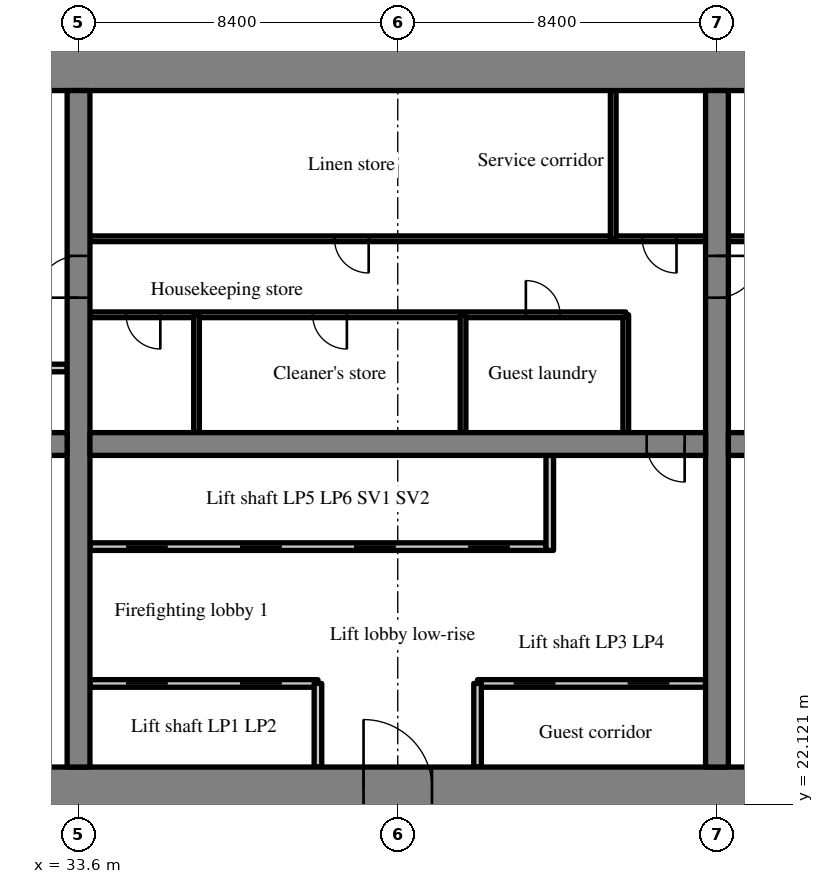
"""IFC4 building model, lengths in metres.
Left out: names, types, materials, properties, quantities, classifications, styles, units other than length and angle.
Written with IfcOpenShell. Run it as: python <this file> out.ifc"""

import sys

from ifc_helpers import new_model, si_unit, direction, frame, frame_2d, origin, place, context, subcontext, project, spatial, rectangle, extrude, source, transform, mapped, element, fill, save


model = new_model("IFC4")
c1 = context("Model", 3, precision=1e-05, world=origin(), true_north=direction((0.0, 1.0)))
c2 = subcontext(c1, "Body", "Model", "MODEL_VIEW")
j1 = project(units=[si_unit("LENGTHUNIT", "METRE"), si_unit("PLANEANGLEUNIT", "RADIAN")], contexts=[c1])
p1 = place(None, origin())
s1 = spatial("IfcSite", under=j1, at=p1, CompositionType="ELEMENT")
p2 = place(p1, origin())
s2 = spatial("IfcBuilding", under=s1, at=p2, CompositionType="ELEMENT")
p3 = place(p2, frame((0.0, 0.0, 35.4)))
s3 = spatial("IfcBuildingStorey", under=s2, at=p3, CompositionType="ELEMENT", Elevation=35.4)
m1 = source(origin(), c2, "Body", "SweptSolid", [
    extrude(rectangle(XDim=50.4, YDim=1.1, at=frame_2d((25.2, 0.0))), origin(), (0.0, 0.0, 1.0), 3.52),
])
p4 = place(p3, frame((25.2, 22.55, 0.0), z_axis=(0.0, 0.0, 1.0), x_axis=(1.0, 0.0, 0.0)))
e1 = element("IfcWall", 1, at=p4, inside=s3, PredefinedType="SHEAR", context=c2, shape_type="MappedRepresentation", body=[
    mapped(m1, transform((0.0, 0.0, 0.0), scale=1.0)),
])
m2 = source(origin(), c2, "Body", "SweptSolid", [
    extrude(rectangle(XDim=1.8, YDim=2.1, at=frame_2d((0.9, 1.05))), frame((0.0, 0.56, 0.0), z_axis=(0.0, -1.0, 0.0), x_axis=(1.0, 0.0, 0.0)), (0.0, 0.0, 1.0), 1.12),
])
p5 = place(p4, frame((15.9, 0.0, 0.0)))
e2 = element("IfcOpeningElement", 2, at=p5, cuts=e1, PredefinedType="OPENING", context=c2, shape_type="MappedRepresentation", body=[
    mapped(m2, transform((0.0, 0.0, 0.0), scale=1.0)),
])
m3 = source(origin(), c2, "Body", "SweptSolid", [
    extrude(rectangle(XDim=1.2, YDim=2.1, at=frame_2d((0.6, 1.05))), frame((0.0, 0.56, 0.0), z_axis=(0.0, -1.0, 0.0), x_axis=(1.0, 0.0, 0.0)), (0.0, 0.0, 1.0), 1.12),
])
p6 = place(p4, frame((27.0, 0.0, 0.0)))
e3 = element("IfcOpeningElement", 3, at=p6, cuts=e1, PredefinedType="OPENING", context=c2, shape_type="MappedRepresentation", body=[
    mapped(m3, transform((0.0, 0.0, 0.0), scale=1.0)),
])
m4 = source(origin(), c2, "Body", "SweptSolid", [
    extrude(rectangle(XDim=0.9, YDim=2.1, at=frame_2d((0.45, 1.05))), frame((0.0, 0.56, 0.0), z_axis=(0.0, -1.0, 0.0), x_axis=(1.0, 0.0, 0.0)), (0.0, 0.0, 1.0), 1.12),
])
p7 = place(p4, frame((33.75, 0.0, 0.0)))
e4 = element("IfcOpeningElement", 4, at=p7, cuts=e1, PredefinedType="OPENING", context=c2, shape_type="MappedRepresentation", body=[
    mapped(m4, transform((0.0, 0.0, 0.0), scale=1.0)),
])
p8 = place(p4, frame((30.75, 0.0, 0.0)))
e5 = element("IfcOpeningElement", 5, at=p8, cuts=e1, PredefinedType="OPENING", context=c2, shape_type="MappedRepresentation", body=[
    mapped(m4, transform((0.0, 0.0, 0.0), scale=1.0)),
])
p9 = place(p4, frame((39.75, 0.0, 0.0)))
e6 = element("IfcOpeningElement", 6, at=p9, cuts=e1, PredefinedType="OPENING", context=c2, shape_type="MappedRepresentation", body=[
    mapped(m4, transform((0.0, 0.0, 0.0), scale=1.0)),
])
p10 = place(p4, frame((36.75, 0.0, 0.0)))
e7 = element("IfcOpeningElement", 7, at=p10, cuts=e1, PredefinedType="OPENING", context=c2, shape_type="MappedRepresentation", body=[
    mapped(m4, transform((0.0, 0.0, 0.0), scale=1.0)),
])
p11 = place(p4, frame((6.425, 0.0, 0.0)))
e8 = element("IfcOpeningElement", 8, at=p11, cuts=e1, PredefinedType="OPENING", context=c2, shape_type="MappedRepresentation", body=[
    mapped(m3, transform((0.0, 0.0, 0.0), scale=1.0)),
])
p12 = place(p4, frame((47.675, 0.0, 0.0)))
e9 = element("IfcOpeningElement", 9, at=p12, cuts=e1, PredefinedType="OPENING", context=c2, shape_type="MappedRepresentation", body=[
    mapped(m3, transform((0.0, 0.0, 0.0), scale=1.0)),
])
p13 = place(p3, frame((25.2, 41.45, 0.0), z_axis=(0.0, 0.0, 1.0), x_axis=(1.0, 0.0, 0.0)))
e10 = element("IfcWall", 10, at=p13, inside=s3, PredefinedType="SHEAR", context=c2, shape_type="MappedRepresentation", body=[
    mapped(m1, transform((0.0, 0.0, 0.0), scale=1.0)),
])
m5 = source(origin(), c2, "Body", "SweptSolid", [
    extrude(rectangle(XDim=17.8, YDim=0.6, at=frame_2d((8.9, 0.0))), origin(), (0.0, 0.0, 1.0), 3.52),
])
p14 = place(p3, frame((33.6, 23.1, 0.0), z_axis=(0.0, 0.0, 1.0), x_axis=(0.0, 1.0, 0.0)))
e11 = element("IfcWall", 11, at=p14, inside=s3, PredefinedType="SHEAR", context=c2, shape_type="MappedRepresentation", body=[
    mapped(m5, transform((0.0, 0.0, 0.0), scale=1.0)),
])
m6 = source(origin(), c2, "Body", "SweptSolid", [
    extrude(rectangle(XDim=1.1, YDim=2.1, at=frame_2d((0.55, 1.05))), frame((0.0, 0.31, 0.0), z_axis=(0.0, -1.0, 0.0), x_axis=(1.0, 0.0, 0.0)), (0.0, 0.0, 1.0), 0.62),
])
p15 = place(p14, frame((12.35, 0.0, 0.0)))
e12 = element("IfcOpeningElement", 12, at=p15, cuts=e11, PredefinedType="OPENING", context=c2, shape_type="MappedRepresentation", body=[
    mapped(m6, transform((0.0, 0.0, 0.0), scale=1.0)),
])
p16 = place(p3, frame((50.4, 23.1, 0.0), z_axis=(0.0, 0.0, 1.0), x_axis=(0.0, 1.0, 0.0)))
e13 = element("IfcWall", 13, at=p16, inside=s3, PredefinedType="SHEAR", context=c2, shape_type="MappedRepresentation", body=[
    mapped(m5, transform((0.0, 0.0, 0.0), scale=1.0)),
])
p17 = place(p16, frame((12.35, 0.0, 0.0)))
e14 = element("IfcOpeningElement", 14, at=p17, cuts=e13, PredefinedType="OPENING", context=c2, shape_type="MappedRepresentation", body=[
    mapped(m6, transform((0.0, 0.0, 0.0), scale=1.0)),
])
m7 = source(origin(), c2, "Body", "SweptSolid", [
    extrude(rectangle(XDim=7.0, YDim=0.6, at=frame_2d((3.5, 0.0))), origin(), (0.0, 0.0, 1.0), 3.52),
])
p18 = place(p3, frame((26.3, 31.6, 0.0), z_axis=(0.0, 0.0, 1.0), x_axis=(1.0, 0.0, 0.0)))
e15 = element("IfcWall", 15, at=p18, inside=s3, PredefinedType="SHEAR", context=c2, shape_type="MappedRepresentation", body=[
    mapped(m7, transform((0.0, 0.0, 0.0), scale=1.0)),
])
p19 = place(p18, frame((5.375, 0.0, 0.0)))
e16 = element("IfcOpeningElement", 16, at=p19, cuts=e15, PredefinedType="OPENING", context=c2, shape_type="MappedRepresentation", body=[
    mapped(m6, transform((0.0, 0.0, 0.0), scale=1.0)),
])
m8 = source(origin(), c2, "Body", "SweptSolid", [
    extrude(rectangle(XDim=16.2, YDim=0.6, at=frame_2d((8.1, 0.0))), origin(), (0.0, 0.0, 1.0), 3.52),
])
p20 = place(p3, frame((33.9, 31.6, 0.0), z_axis=(0.0, 0.0, 1.0), x_axis=(1.0, 0.0, 0.0)))
e17 = element("IfcWall", 17, at=p20, inside=s3, PredefinedType="SHEAR", context=c2, shape_type="MappedRepresentation", body=[
    mapped(m8, transform((0.0, 0.0, 0.0), scale=1.0)),
])
m9 = source(origin(), c2, "Body", "SweptSolid", [
    extrude(rectangle(XDim=1.0, YDim=2.1, at=frame_2d((0.5, 1.05))), frame((0.0, 0.31, 0.0), z_axis=(0.0, -1.0, 0.0), x_axis=(1.0, 0.0, 0.0)), (0.0, 0.0, 1.0), 0.62),
])
p21 = place(p20, frame((14.65, 0.0, 0.0)))
e18 = element("IfcOpeningElement", 18, at=p21, cuts=e17, PredefinedType="OPENING", context=c2, shape_type="MappedRepresentation", body=[
    mapped(m9, transform((0.0, 0.0, 0.0), scale=1.0)),
])
m10 = source(origin(), c2, "Body", "SweptSolid", [
    extrude(rectangle(XDim=16.2, YDim=0.6, at=frame_2d((8.1, 0.0))), origin(), (0.0, 0.0, 1.0), 3.52),
])
p22 = place(p3, frame((50.7, 31.6, 0.0), z_axis=(0.0, 0.0, 1.0), x_axis=(1.0, 0.0, 0.0)))
e19 = element("IfcWall", 19, at=p22, inside=s3, PredefinedType="SHEAR", context=c2, shape_type="MappedRepresentation", body=[
    mapped(m10, transform((0.0, 0.0, 0.0), scale=1.0)),
])
p23 = place(p22, frame((0.55, 0.0, 0.0)))
e20 = element("IfcOpeningElement", 20, at=p23, cuts=e19, PredefinedType="OPENING", context=c2, shape_type="MappedRepresentation", body=[
    mapped(m9, transform((0.0, 0.0, 0.0), scale=1.0)),
])
m11 = source(origin(), c2, "Body", "SweptSolid", [
    extrude(rectangle(XDim=6.0, YDim=0.2, at=frame_2d((3.0, 0.0))), origin(), (0.0, 0.0, 1.0), 3.52),
])
p24 = place(p3, frame((33.9, 25.3, 0.0), z_axis=(0.0, 0.0, 1.0), x_axis=(1.0, 0.0, 0.0)))
e21 = element("IfcWall", 21, at=p24, inside=s3, PredefinedType="SOLIDWALL", context=c2, shape_type="MappedRepresentation", body=[
    mapped(m11, transform((0.0, 0.0, 0.0), scale=1.0)),
])
m12 = source(origin(), c2, "Body", "SweptSolid", [
    extrude(rectangle(XDim=1.1, YDim=2.1, at=frame_2d((0.55, 1.05))), frame((0.0, 0.11, 0.0), z_axis=(0.0, -1.0, 0.0), x_axis=(1.0, 0.0, 0.0)), (0.0, 0.0, 1.0), 0.22),
])
p25 = place(p24, frame((0.95, 0.0, 0.0)))
e22 = element("IfcOpeningElement", 22, at=p25, cuts=e21, PredefinedType="OPENING", context=c2, shape_type="MappedRepresentation", body=[
    mapped(m12, transform((0.0, 0.0, 0.0), scale=1.0)),
])
p26 = place(p24, frame((3.95, 0.0, 0.0)))
e23 = element("IfcOpeningElement", 23, at=p26, cuts=e21, PredefinedType="OPENING", context=c2, shape_type="MappedRepresentation", body=[
    mapped(m12, transform((0.0, 0.0, 0.0), scale=1.0)),
])
p27 = place(p3, frame((44.1, 25.3, 0.0), z_axis=(0.0, 0.0, 1.0), x_axis=(1.0, 0.0, 0.0)))
e24 = element("IfcWall", 24, at=p27, inside=s3, PredefinedType="SOLIDWALL", context=c2, shape_type="MappedRepresentation", body=[
    mapped(m11, transform((0.0, 0.0, 0.0), scale=1.0)),
])
p28 = place(p27, frame((0.95, 0.0, 0.0)))
e25 = element("IfcOpeningElement", 25, at=p28, cuts=e24, PredefinedType="OPENING", context=c2, shape_type="MappedRepresentation", body=[
    mapped(m12, transform((0.0, 0.0, 0.0), scale=1.0)),
])
p29 = place(p27, frame((3.95, 0.0, 0.0)))
e26 = element("IfcOpeningElement", 26, at=p29, cuts=e24, PredefinedType="OPENING", context=c2, shape_type="MappedRepresentation", body=[
    mapped(m12, transform((0.0, 0.0, 0.0), scale=1.0)),
])
m13 = source(origin(), c2, "Body", "SweptSolid", [
    extrude(rectangle(XDim=12.0, YDim=0.2, at=frame_2d((6.0, 0.0))), origin(), (0.0, 0.0, 1.0), 3.52),
])
p30 = place(p3, frame((33.9, 28.9, 0.0), z_axis=(0.0, 0.0, 1.0), x_axis=(1.0, 0.0, 0.0)))
e27 = element("IfcWall", 27, at=p30, inside=s3, PredefinedType="SOLIDWALL", context=c2, shape_type="MappedRepresentation", body=[
    mapped(m13, transform((0.0, 0.0, 0.0), scale=1.0)),
])
p31 = place(p30, frame((0.95, 0.0, 0.0)))
e28 = element("IfcOpeningElement", 28, at=p31, cuts=e27, PredefinedType="OPENING", context=c2, shape_type="MappedRepresentation", body=[
    mapped(m12, transform((0.0, 0.0, 0.0), scale=1.0)),
])
p32 = place(p30, frame((3.95, 0.0, 0.0)))
e29 = element("IfcOpeningElement", 29, at=p32, cuts=e27, PredefinedType="OPENING", context=c2, shape_type="MappedRepresentation", body=[
    mapped(m12, transform((0.0, 0.0, 0.0), scale=1.0)),
])
p33 = place(p30, frame((6.95, 0.0, 0.0)))
e30 = element("IfcOpeningElement", 30, at=p33, cuts=e27, PredefinedType="OPENING", context=c2, shape_type="MappedRepresentation", body=[
    mapped(m12, transform((0.0, 0.0, 0.0), scale=1.0)),
])
p34 = place(p30, frame((9.95, 0.0, 0.0)))
e31 = element("IfcOpeningElement", 31, at=p34, cuts=e27, PredefinedType="OPENING", context=c2, shape_type="MappedRepresentation", body=[
    mapped(m12, transform((0.0, 0.0, 0.0), scale=1.0)),
])
m14 = source(origin(), c2, "Body", "SweptSolid", [
    extrude(rectangle(XDim=2.2, YDim=0.2, at=frame_2d((1.1, 0.0))), origin(), (0.0, 0.0, 1.0), 3.52),
])
for number, where, z_axis, x_axis in (
    (32, (39.9, 23.1, 0.0), (0.0, 0.0, 1.0), (0.0, 1.0, 0.0)),
    (33, (44.1, 23.1, 0.0), (0.0, 0.0, 1.0), (0.0, 1.0, 0.0)),
):
    element("IfcWall", number, at=place(p3, frame(where, z_axis=z_axis, x_axis=x_axis)), inside=s3, PredefinedType="SOLIDWALL", context=c2, shape_type="MappedRepresentation", body=[
        mapped(m14, transform((0.0, 0.0, 0.0), scale=1.0)),
    ])
m15 = source(origin(), c2, "Body", "SweptSolid", [
    extrude(rectangle(XDim=2.5, YDim=0.2, at=frame_2d((1.25, 0.0))), origin(), (0.0, 0.0, 1.0), 3.52),
])
p35 = place(p3, frame((46.0, 28.8, 0.0), z_axis=(0.0, 0.0, 1.0), x_axis=(0.0, 1.0, 0.0)))
e34 = element("IfcWall", 34, at=p35, inside=s3, PredefinedType="SOLIDWALL", context=c2, shape_type="MappedRepresentation", body=[
    mapped(m15, transform((0.0, 0.0, 0.0), scale=1.0)),
])
m16 = source(origin(), c2, "Body", "SweptSolid", [
    extrude(rectangle(XDim=3.1, YDim=0.15, at=frame_2d((1.55, 0.0))), origin(), (0.0, 0.0, 1.0), 3.52),
])
p36 = place(p3, frame((48.0, 31.9, 0.0), z_axis=(0.0, 0.0, 1.0), x_axis=(0.0, 1.0, 0.0)))
e35 = element("IfcWall", 35, at=p36, inside=s3, PredefinedType="PARTITIONING", context=c2, shape_type="MappedRepresentation", body=[
    mapped(m16, transform((0.0, 0.0, 0.0), scale=1.0)),
])
m17 = source(origin(), c2, "Body", "SweptSolid", [
    extrude(rectangle(XDim=14.1, YDim=0.15, at=frame_2d((7.05, 0.0))), origin(), (0.0, 0.0, 1.0), 3.52),
])
p37 = place(p3, frame((33.9, 35.0, 0.0), z_axis=(0.0, 0.0, 1.0), x_axis=(1.0, 0.0, 0.0)))
e36 = element("IfcWall", 36, at=p37, inside=s3, PredefinedType="PARTITIONING", context=c2, shape_type="MappedRepresentation", body=[
    mapped(m17, transform((0.0, 0.0, 0.0), scale=1.0)),
])
m18 = source(origin(), c2, "Body", "SweptSolid", [
    extrude(rectangle(XDim=0.9, YDim=2.1, at=frame_2d((0.45, 1.05))), frame((0.0, 0.085, 0.0), z_axis=(0.0, -1.0, 0.0), x_axis=(1.0, 0.0, 0.0)), (0.0, 0.0, 1.0), 0.17),
])
p38 = place(p37, frame((0.952, 0.0, 0.0)))
e37 = element("IfcOpeningElement", 37, at=p38, cuts=e36, PredefinedType="OPENING", context=c2, shape_type="MappedRepresentation", body=[
    mapped(m18, transform((0.0, 0.0, 0.0), scale=1.0)),
])
p39 = place(p37, frame((5.861, 0.0, 0.0)))
e38 = element("IfcOpeningElement", 38, at=p39, cuts=e36, PredefinedType="OPENING", context=c2, shape_type="MappedRepresentation", body=[
    mapped(m18, transform((0.0, 0.0, 0.0), scale=1.0)),
])
p40 = place(p37, frame((11.471, 0.0, 0.0)))
e39 = element("IfcOpeningElement", 39, at=p40, cuts=e36, PredefinedType="OPENING", context=c2, shape_type="MappedRepresentation", body=[
    mapped(m18, transform((0.0, 0.0, 0.0), scale=1.0)),
])
m19 = source(origin(), c2, "Body", "SweptSolid", [
    extrude(rectangle(XDim=16.2, YDim=0.15, at=frame_2d((8.1, 0.0))), origin(), (0.0, 0.0, 1.0), 3.52),
])
p41 = place(p3, frame((33.9, 37.0, 0.0), z_axis=(0.0, 0.0, 1.0), x_axis=(1.0, 0.0, 0.0)))
e40 = element("IfcWall", 40, at=p41, inside=s3, PredefinedType="PARTITIONING", context=c2, shape_type="MappedRepresentation", body=[
    mapped(m19, transform((0.0, 0.0, 0.0), scale=1.0)),
])
p42 = place(p41, frame((6.435, 0.0, 0.0)))
e41 = element("IfcOpeningElement", 41, at=p42, cuts=e40, PredefinedType="OPENING", context=c2, shape_type="MappedRepresentation", body=[
    mapped(m18, transform((0.0, 0.0, 0.0), scale=1.0)),
])
p43 = place(p41, frame((14.535, 0.0, 0.0)))
e42 = element("IfcOpeningElement", 42, at=p43, cuts=e40, PredefinedType="OPENING", context=c2, shape_type="MappedRepresentation", body=[
    mapped(m18, transform((0.0, 0.0, 0.0), scale=1.0)),
])
for number, where, z_axis, x_axis in (
    (43, (36.705, 31.9, 0.0), (0.0, 0.0, 1.0), (0.0, 1.0, 0.0)),
    (44, (43.718, 31.9, 0.0), (0.0, 0.0, 1.0), (0.0, 1.0, 0.0)),
):
    element("IfcWall", number, at=place(p3, frame(where, z_axis=z_axis, x_axis=x_axis)), inside=s3, PredefinedType="PARTITIONING", context=c2, shape_type="MappedRepresentation", body=[
        mapped(m16, transform((0.0, 0.0, 0.0), scale=1.0)),
    ])
m20 = source(origin(), c2, "Body", "SweptSolid", [
    extrude(rectangle(XDim=3.9, YDim=0.15, at=frame_2d((1.95, 0.0))), origin(), (0.0, 0.0, 1.0), 3.52),
])
p44 = place(p3, frame((47.67, 37.0, 0.0), z_axis=(0.0, 0.0, 1.0), x_axis=(0.0, 1.0, 0.0)))
e45 = element("IfcWall", 45, at=p44, inside=s3, PredefinedType="PARTITIONING", context=c2, shape_type="MappedRepresentation", body=[
    mapped(m20, transform((0.0, 0.0, 0.0), scale=1.0)),
])
m21 = source(origin(), c2, "Body", "SweptSolid", [
    extrude(rectangle(XDim=16.2, YDim=0.15, at=frame_2d((8.1, 0.0))), origin(), (0.0, 0.0, 1.0), 3.52),
])
p45 = place(p3, frame((66.9, 37.0, 0.0), z_axis=(0.0, 0.0, 1.0), x_axis=(-1.0, 0.0, 0.0)))
e46 = element("IfcWall", 46, at=p45, inside=s3, PredefinedType="PARTITIONING", context=c2, shape_type="MappedRepresentation", body=[
    mapped(m21, transform((0.0, 0.0, 0.0), scale=1.0)),
])
p46 = place(p45, frame((1.575, 0.0, 0.0)))
e47 = element("IfcOpeningElement", 47, at=p46, cuts=e46, PredefinedType="OPENING", context=c2, shape_type="MappedRepresentation", body=[
    mapped(m18, transform((0.0, 0.0, 0.0), scale=1.0)),
])
p47 = place(p45, frame((7.245, 0.0, 0.0)))
e48 = element("IfcOpeningElement", 48, at=p47, cuts=e46, PredefinedType="OPENING", context=c2, shape_type="MappedRepresentation", body=[
    mapped(m18, transform((0.0, 0.0, 0.0), scale=1.0)),
])
p48 = place(p45, frame((12.105, 0.0, 0.0)))
e49 = element("IfcOpeningElement", 49, at=p48, cuts=e46, PredefinedType="OPENING", context=c2, shape_type="MappedRepresentation", body=[
    mapped(m18, transform((0.0, 0.0, 0.0), scale=1.0)),
])
p49 = place(p45, frame((14.535, 0.0, 0.0)))
e50 = element("IfcOpeningElement", 50, at=p49, cuts=e46, PredefinedType="OPENING", context=c2, shape_type="MappedRepresentation", body=[
    mapped(m18, transform((0.0, 0.0, 0.0), scale=1.0)),
])
m22 = source(origin(), c2, "Body", "SweptSolid", [
    extrude(rectangle(XDim=2.15, YDim=0.2, at=frame_2d((1.075, 0.0))), origin(), (0.0, 0.0, 1.0), 3.52),
])
p50 = place(p3, frame((31.15, 33.6, 0.0), z_axis=(0.0, 0.0, 1.0), x_axis=(1.0, 0.0, 0.0)))
e51 = element("IfcWall", 51, at=p50, inside=s3, PredefinedType="SOLIDWALL", context=c2, shape_type="MappedRepresentation", body=[
    mapped(m22, transform((0.0, 0.0, 0.0), scale=1.0)),
])
m23 = source(origin(), c2, "Body", "SweptSolid", [
    extrude(rectangle(XDim=1.8, YDim=2.1, at=frame_2d((0.9, 1.05))), frame((0.0, 0.325, 0.0), z_axis=(0.0, -1.0, 0.0), x_axis=(1.0, 0.0, 0.0)), (0.0, 0.0, 1.0), 0.05),
])
p51 = place(p5, origin())
e52 = element("IfcDoor", 52, at=p51, inside=s3, OperationType="DOUBLE_DOOR_SINGLE_SWING", PredefinedType="DOOR", context=c2, shape_type="MappedRepresentation", body=[
    mapped(m23, transform((0.0, 0.0, 0.0), scale=1.0)),
])
fill(e2, e52)
m24 = source(origin(), c2, "Body", "SweptSolid", [
    extrude(rectangle(XDim=1.0, YDim=2.1, at=frame_2d((0.5, 1.05))), frame((0.0, 0.025, 0.0), z_axis=(0.0, -1.0, 0.0), x_axis=(1.0, 0.0, 0.0)), (0.0, 0.0, 1.0), 0.05),
])
p52 = place(p21, origin())
e53 = element("IfcDoor", 53, at=p52, inside=s3, OperationType="SINGLE_SWING_RIGHT", PredefinedType="DOOR", context=c2, shape_type="MappedRepresentation", body=[
    mapped(m24, transform((0.0, 0.0, 0.0), scale=1.0)),
])
fill(e18, e53)
m25 = source(origin(), c2, "Body", "SweptSolid", [
    extrude(rectangle(XDim=1.1, YDim=2.1, at=frame_2d((0.55, 1.05))), frame((0.0, 0.025, 0.0), z_axis=(0.0, -1.0, 0.0), x_axis=(1.0, 0.0, 0.0)), (0.0, 0.0, 1.0), 0.05),
])
p53 = place(p25, origin())
e54 = element("IfcDoor", 54, at=p53, inside=s3, OperationType="SLIDING_TO_LEFT", PredefinedType="DOOR", context=c2, shape_type="MappedRepresentation", body=[
    mapped(m25, transform((0.0, 0.0, 0.0), scale=1.0)),
])
fill(e22, e54)
p54 = place(p26, origin())
e55 = element("IfcDoor", 55, at=p54, inside=s3, OperationType="SLIDING_TO_RIGHT", PredefinedType="DOOR", context=c2, shape_type="MappedRepresentation", body=[
    mapped(m25, transform((0.0, 0.0, 0.0), scale=1.0)),
])
fill(e23, e55)
p55 = place(p28, origin())
e56 = element("IfcDoor", 56, at=p55, inside=s3, OperationType="SLIDING_TO_LEFT", PredefinedType="DOOR", context=c2, shape_type="MappedRepresentation", body=[
    mapped(m25, transform((0.0, 0.0, 0.0), scale=1.0)),
])
fill(e25, e56)
p56 = place(p29, origin())
e57 = element("IfcDoor", 57, at=p56, inside=s3, OperationType="SLIDING_TO_RIGHT", PredefinedType="DOOR", context=c2, shape_type="MappedRepresentation", body=[
    mapped(m25, transform((0.0, 0.0, 0.0), scale=1.0)),
])
fill(e26, e57)
p57 = place(p31, origin())
e58 = element("IfcDoor", 58, at=p57, inside=s3, OperationType="SLIDING_TO_LEFT", PredefinedType="DOOR", context=c2, shape_type="MappedRepresentation", body=[
    mapped(m25, transform((0.0, 0.0, 0.0), scale=1.0)),
])
fill(e28, e58)
p58 = place(p32, origin())
e59 = element("IfcDoor", 59, at=p58, inside=s3, OperationType="SLIDING_TO_RIGHT", PredefinedType="DOOR", context=c2, shape_type="MappedRepresentation", body=[
    mapped(m25, transform((0.0, 0.0, 0.0), scale=1.0)),
])
fill(e29, e59)
p59 = place(p33, origin())
e60 = element("IfcDoor", 60, at=p59, inside=s3, OperationType="SLIDING_TO_LEFT", PredefinedType="DOOR", context=c2, shape_type="MappedRepresentation", body=[
    mapped(m25, transform((0.0, 0.0, 0.0), scale=1.0)),
])
fill(e30, e60)
p60 = place(p34, origin())
e61 = element("IfcDoor", 61, at=p60, inside=s3, OperationType="SLIDING_TO_RIGHT", PredefinedType="DOOR", context=c2, shape_type="MappedRepresentation", body=[
    mapped(m25, transform((0.0, 0.0, 0.0), scale=1.0)),
])
fill(e31, e61)
m26 = source(origin(), c2, "Body", "SweptSolid", [
    extrude(rectangle(XDim=0.9, YDim=2.1, at=frame_2d((0.45, 1.05))), frame((0.0, 0.025, 0.0), z_axis=(0.0, -1.0, 0.0), x_axis=(1.0, 0.0, 0.0)), (0.0, 0.0, 1.0), 0.05),
])
p61 = place(p38, origin())
e62 = element("IfcDoor", 62, at=p61, inside=s3, OperationType="SINGLE_SWING_RIGHT", PredefinedType="DOOR", context=c2, shape_type="MappedRepresentation", body=[
    mapped(m26, transform((0.0, 0.0, 0.0), scale=1.0)),
])
fill(e37, e62)
p62 = place(p39, origin())
e63 = element("IfcDoor", 63, at=p62, inside=s3, OperationType="SINGLE_SWING_RIGHT", PredefinedType="DOOR", context=c2, shape_type="MappedRepresentation", body=[
    mapped(m26, transform((0.0, 0.0, 0.0), scale=1.0)),
])
fill(e38, e63)
p63 = place(p40, origin())
e64 = element("IfcDoor", 64, at=p63, inside=s3, OperationType="SINGLE_SWING_LEFT", PredefinedType="DOOR", context=c2, shape_type="MappedRepresentation", body=[
    mapped(m26, transform((0.0, 0.0, 0.0), scale=1.0)),
])
fill(e39, e64)
p64 = place(p42, origin())
e65 = element("IfcDoor", 65, at=p64, inside=s3, OperationType="SINGLE_SWING_RIGHT", PredefinedType="DOOR", context=c2, shape_type="MappedRepresentation", body=[
    mapped(m26, transform((0.0, 0.0, 0.0), scale=1.0)),
])
fill(e41, e65)
p65 = place(p43, origin())
e66 = element("IfcDoor", 66, at=p65, inside=s3, OperationType="SINGLE_SWING_RIGHT", PredefinedType="DOOR", context=c2, shape_type="MappedRepresentation", body=[
    mapped(m26, transform((0.0, 0.0, 0.0), scale=1.0)),
])
fill(e42, e66)
p66 = place(p15, origin())
e67 = element("IfcDoor", 67, at=p66, inside=s3, OperationType="SINGLE_SWING_LEFT", PredefinedType="DOOR", context=c2, shape_type="MappedRepresentation", body=[
    mapped(m25, transform((0.0, 0.0, 0.0), scale=1.0)),
])
fill(e12, e67)
p67 = place(p17, origin())
e68 = element("IfcDoor", 68, at=p67, inside=s3, OperationType="SINGLE_SWING_RIGHT", PredefinedType="DOOR", context=c2, shape_type="MappedRepresentation", body=[
    mapped(m25, transform((0.0, 0.0, 0.0), scale=1.0)),
])
fill(e14, e68)
save(model, sys.argv[1])
